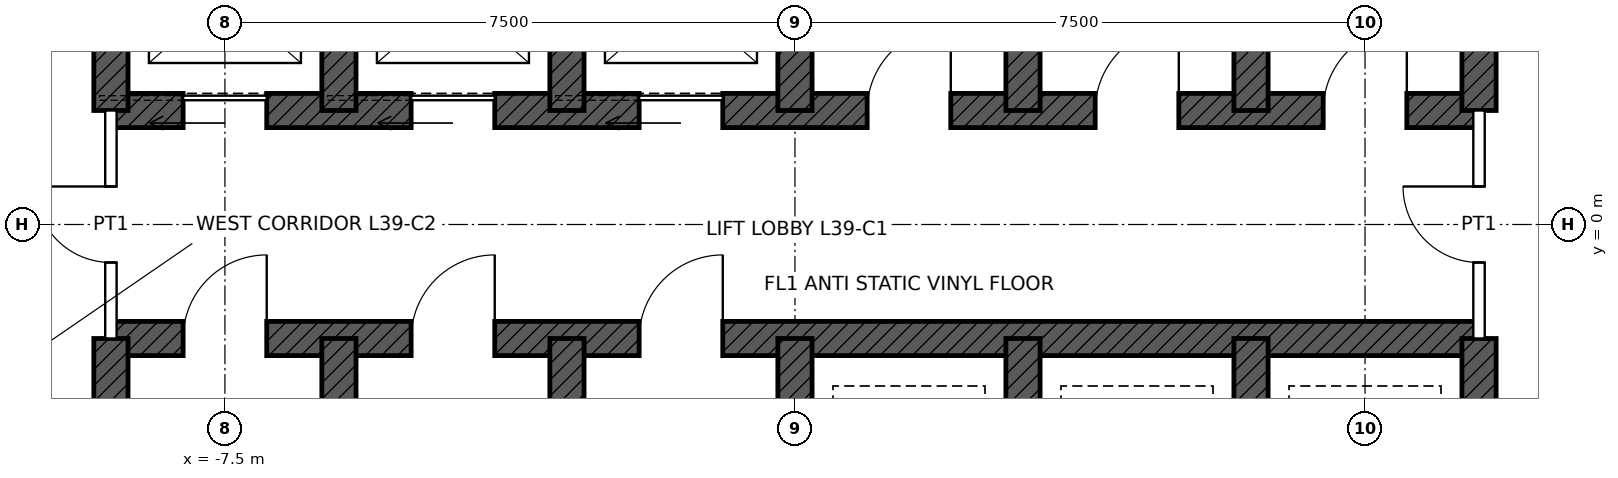
"""IFC4 building model, lengths in metres.
Left out: names, types, materials, properties, quantities, classifications, styles, units other than length and angle.
Written with IfcOpenShell. Run it as: python <this file> out.ifc"""

import sys

from ifc_helpers import new_model, si_unit, direction, frame, frame_2d, origin, place, context, subcontext, project, spatial, rectangle, extrude, element, fill, save


model = new_model("IFC4")
c1 = context("Model", 3, precision=1e-05, world=origin(), true_north=direction((0.0, 1.0)))
c2 = subcontext(c1, "Body", "Model", "MODEL_VIEW")
j1 = project(units=[si_unit("LENGTHUNIT", "METRE"), si_unit("PLANEANGLEUNIT", "RADIAN")], contexts=[c1])
p1 = place(None, origin())
s1 = spatial("IfcSite", under=j1, at=p1, CompositionType="ELEMENT")
p2 = place(p1, origin())
s2 = spatial("IfcBuilding", under=s1, at=p2, CompositionType="ELEMENT")
p3 = place(p2, frame((0.0, 0.0, 189.9)))
s3 = spatial("IfcBuildingStorey", under=s2, at=p3, CompositionType="ELEMENT", Elevation=189.9)
p4 = place(p3, frame((-9.0, 1.5, 0.0), z_axis=(0.0, 0.0, 1.0), x_axis=(1.0, 0.0, 0.0)))
e1 = element("IfcWall", 1, at=p4, inside=s3, PredefinedType="SHEAR", context=c2, shape_type="SweptSolid", body=[
    extrude(rectangle(XDim=18.0, YDim=0.45, at=frame_2d((9.0, 0.0))), origin(), (0.0, 0.0, 1.0), 4.0),
])
p5 = place(p4, frame((0.95, 0.0, 0.0)))
e2 = element("IfcOpeningElement", 2, at=p5, cuts=e1, PredefinedType="OPENING", context=c2, shape_type="SweptSolid", body=[
    extrude(rectangle(XDim=1.1, YDim=2.1, at=frame_2d((0.55, 1.05))), frame((0.0, 0.235, 0.0), z_axis=(0.0, -1.0, 0.0), x_axis=(1.0, 0.0, 0.0)), (0.0, 0.0, 1.0), 0.47),
])
p6 = place(p4, frame((3.95, 0.0, 0.0)))
e3 = element("IfcOpeningElement", 3, at=p6, cuts=e1, PredefinedType="OPENING", context=c2, shape_type="SweptSolid", body=[
    extrude(rectangle(XDim=1.1, YDim=2.1, at=frame_2d((0.55, 1.05))), frame((0.0, 0.235, 0.0), z_axis=(0.0, -1.0, 0.0), x_axis=(1.0, 0.0, 0.0)), (0.0, 0.0, 1.0), 0.47),
])
p7 = place(p4, frame((6.95, 0.0, 0.0)))
e4 = element("IfcOpeningElement", 4, at=p7, cuts=e1, PredefinedType="OPENING", context=c2, shape_type="SweptSolid", body=[
    extrude(rectangle(XDim=1.1, YDim=2.1, at=frame_2d((0.55, 1.05))), frame((0.0, 0.235, 0.0), z_axis=(0.0, -1.0, 0.0), x_axis=(1.0, 0.0, 0.0)), (0.0, 0.0, 1.0), 0.47),
])
p8 = place(p4, frame((9.95, 0.0, 0.0)))
e5 = element("IfcOpeningElement", 5, at=p8, cuts=e1, PredefinedType="OPENING", context=c2, shape_type="SweptSolid", body=[
    extrude(rectangle(XDim=1.1, YDim=2.1, at=frame_2d((0.55, 1.05))), frame((0.0, 0.235, 0.0), z_axis=(0.0, -1.0, 0.0), x_axis=(1.0, 0.0, 0.0)), (0.0, 0.0, 1.0), 0.47),
])
p9 = place(p4, frame((12.95, 0.0, 0.0)))
e6 = element("IfcOpeningElement", 6, at=p9, cuts=e1, PredefinedType="OPENING", context=c2, shape_type="SweptSolid", body=[
    extrude(rectangle(XDim=1.1, YDim=2.1, at=frame_2d((0.55, 1.05))), frame((0.0, 0.235, 0.0), z_axis=(0.0, -1.0, 0.0), x_axis=(1.0, 0.0, 0.0)), (0.0, 0.0, 1.0), 0.47),
])
p10 = place(p4, frame((15.95, 0.0, 0.0)))
e7 = element("IfcOpeningElement", 7, at=p10, cuts=e1, PredefinedType="OPENING", context=c2, shape_type="SweptSolid", body=[
    extrude(rectangle(XDim=1.1, YDim=2.1, at=frame_2d((0.55, 1.05))), frame((0.0, 0.235, 0.0), z_axis=(0.0, -1.0, 0.0), x_axis=(1.0, 0.0, 0.0)), (0.0, 0.0, 1.0), 0.47),
])
p11 = place(p3, frame((-9.0, -1.5, 0.0), z_axis=(0.0, 0.0, 1.0), x_axis=(1.0, 0.0, 0.0)))
e8 = element("IfcWall", 8, at=p11, inside=s3, PredefinedType="SHEAR", context=c2, shape_type="SweptSolid", body=[
    extrude(rectangle(XDim=18.0, YDim=0.45, at=frame_2d((9.0, 0.0))), origin(), (0.0, 0.0, 1.0), 4.0),
])
p12 = place(p11, frame((0.95, 0.0, 0.0)))
e9 = element("IfcOpeningElement", 9, at=p12, cuts=e8, PredefinedType="OPENING", context=c2, shape_type="SweptSolid", body=[
    extrude(rectangle(XDim=1.1, YDim=2.1, at=frame_2d((0.55, 1.05))), frame((0.0, 0.235, 0.0), z_axis=(0.0, -1.0, 0.0), x_axis=(1.0, 0.0, 0.0)), (0.0, 0.0, 1.0), 0.47),
])
p13 = place(p11, frame((3.95, 0.0, 0.0)))
e10 = element("IfcOpeningElement", 10, at=p13, cuts=e8, PredefinedType="OPENING", context=c2, shape_type="SweptSolid", body=[
    extrude(rectangle(XDim=1.1, YDim=2.1, at=frame_2d((0.55, 1.05))), frame((0.0, 0.235, 0.0), z_axis=(0.0, -1.0, 0.0), x_axis=(1.0, 0.0, 0.0)), (0.0, 0.0, 1.0), 0.47),
])
p14 = place(p11, frame((6.95, 0.0, 0.0)))
e11 = element("IfcOpeningElement", 11, at=p14, cuts=e8, PredefinedType="OPENING", context=c2, shape_type="SweptSolid", body=[
    extrude(rectangle(XDim=1.1, YDim=2.1, at=frame_2d((0.55, 1.05))), frame((0.0, 0.235, 0.0), z_axis=(0.0, -1.0, 0.0), x_axis=(1.0, 0.0, 0.0)), (0.0, 0.0, 1.0), 0.47),
])
for number, where, z_axis, x_axis in (
    (12, (-9.0, 1.5, 0.0), (0.0, 0.0, 1.0), (0.0, 1.0, 0.0)),
    (13, (9.0, 1.5, 0.0), (0.0, 0.0, 1.0), (0.0, 1.0, 0.0)),
    (14, (-9.0, -4.5, 0.0), (0.0, 0.0, 1.0), (0.0, 1.0, 0.0)),
    (15, (9.0, -4.5, 0.0), (0.0, 0.0, 1.0), (0.0, 1.0, 0.0)),
    (16, (-6.0, 1.5, 0.0), (0.0, 0.0, 1.0), (0.0, 1.0, 0.0)),
    (17, (-3.0, 1.5, 0.0), (0.0, 0.0, 1.0), (0.0, 1.0, 0.0)),
    (18, (0.0, 1.5, 0.0), (0.0, 0.0, 1.0), (0.0, 1.0, 0.0)),
    (19, (3.0, 1.5, 0.0), (0.0, 0.0, 1.0), (0.0, 1.0, 0.0)),
    (20, (6.0, 1.5, 0.0), (0.0, 0.0, 1.0), (0.0, 1.0, 0.0)),
    (21, (-6.0, -4.5, 0.0), (0.0, 0.0, 1.0), (0.0, 1.0, 0.0)),
    (22, (-3.0, -4.5, 0.0), (0.0, 0.0, 1.0), (0.0, 1.0, 0.0)),
    (23, (0.0, -4.5, 0.0), (0.0, 0.0, 1.0), (0.0, 1.0, 0.0)),
    (24, (3.0, -4.5, 0.0), (0.0, 0.0, 1.0), (0.0, 1.0, 0.0)),
    (25, (6.0, -4.5, 0.0), (0.0, 0.0, 1.0), (0.0, 1.0, 0.0)),
):
    element("IfcWall", number, at=place(p3, frame(where, z_axis=z_axis, x_axis=x_axis)), inside=s3, PredefinedType="SHEAR", context=c2, shape_type="SweptSolid", body=[
        extrude(rectangle(XDim=3.0, YDim=0.45, at=frame_2d((1.5, 0.0))), origin(), (0.0, 0.0, 1.0), 4.0),
    ])
p15 = place(p3, frame((-9.0, -1.5, 0.0), z_axis=(0.0, 0.0, 1.0), x_axis=(0.0, 1.0, 0.0)))
e26 = element("IfcWall", 26, at=p15, inside=s3, PredefinedType="PARTITIONING", context=c2, shape_type="SweptSolid", body=[
    extrude(rectangle(XDim=3.0, YDim=0.15, at=frame_2d((1.5, 0.0))), origin(), (0.0, 0.0, 1.0), 3.75),
])
p16 = place(p15, frame((1.0, 0.0, 0.0)))
e27 = element("IfcOpeningElement", 27, at=p16, cuts=e26, PredefinedType="OPENING", context=c2, shape_type="SweptSolid", body=[
    extrude(rectangle(XDim=1.0, YDim=2.4, at=frame_2d((0.5, 1.2))), frame((0.0, 0.085, 0.0), z_axis=(0.0, -1.0, 0.0), x_axis=(1.0, 0.0, 0.0)), (0.0, 0.0, 1.0), 0.17),
])
p17 = place(p3, frame((9.0, -1.5, 0.0), z_axis=(0.0, 0.0, 1.0), x_axis=(0.0, 1.0, 0.0)))
e28 = element("IfcWall", 28, at=p17, inside=s3, PredefinedType="PARTITIONING", context=c2, shape_type="SweptSolid", body=[
    extrude(rectangle(XDim=3.0, YDim=0.15, at=frame_2d((1.5, 0.0))), origin(), (0.0, 0.0, 1.0), 3.75),
])
p18 = place(p17, frame((1.0, 0.0, 0.0)))
e29 = element("IfcOpeningElement", 29, at=p18, cuts=e28, PredefinedType="OPENING", context=c2, shape_type="SweptSolid", body=[
    extrude(rectangle(XDim=1.0, YDim=2.4, at=frame_2d((0.5, 1.2))), frame((0.0, 0.085, 0.0), z_axis=(0.0, -1.0, 0.0), x_axis=(1.0, 0.0, 0.0)), (0.0, 0.0, 1.0), 0.17),
])
p19 = place(p5, origin())
e30 = element("IfcDoor", 30, at=p19, inside=s3, OperationType="SLIDING_TO_LEFT", PredefinedType="DOOR", context=c2, shape_type="SweptSolid", body=[
    extrude(rectangle(XDim=1.1, YDim=2.1, at=frame_2d((0.55, 1.05))), frame((0.0, 0.025, 0.0), z_axis=(0.0, -1.0, 0.0), x_axis=(1.0, 0.0, 0.0)), (0.0, 0.0, 1.0), 0.05),
])
fill(e2, e30)
p20 = place(p6, origin())
e31 = element("IfcDoor", 31, at=p20, inside=s3, OperationType="SLIDING_TO_LEFT", PredefinedType="DOOR", context=c2, shape_type="SweptSolid", body=[
    extrude(rectangle(XDim=1.1, YDim=2.1, at=frame_2d((0.55, 1.05))), frame((0.0, 0.025, 0.0), z_axis=(0.0, -1.0, 0.0), x_axis=(1.0, 0.0, 0.0)), (0.0, 0.0, 1.0), 0.05),
])
fill(e3, e31)
p21 = place(p7, origin())
e32 = element("IfcDoor", 32, at=p21, inside=s3, OperationType="SLIDING_TO_LEFT", PredefinedType="DOOR", context=c2, shape_type="SweptSolid", body=[
    extrude(rectangle(XDim=1.1, YDim=2.1, at=frame_2d((0.55, 1.05))), frame((0.0, 0.025, 0.0), z_axis=(0.0, -1.0, 0.0), x_axis=(1.0, 0.0, 0.0)), (0.0, 0.0, 1.0), 0.05),
])
fill(e4, e32)
p22 = place(p16, origin())
e33 = element("IfcDoor", 33, at=p22, inside=s3, OperationType="SINGLE_SWING_RIGHT", PredefinedType="DOOR", context=c2, shape_type="SweptSolid", body=[
    extrude(rectangle(XDim=1.0, YDim=2.4, at=frame_2d((0.5, 1.2))), frame((0.0, 0.025, 0.0), z_axis=(0.0, -1.0, 0.0), x_axis=(1.0, 0.0, 0.0)), (0.0, 0.0, 1.0), 0.05),
])
fill(e27, e33)
p23 = place(p18, origin())
e34 = element("IfcDoor", 34, at=p23, inside=s3, OperationType="SINGLE_SWING_RIGHT", PredefinedType="DOOR", context=c2, shape_type="SweptSolid", body=[
    extrude(rectangle(XDim=1.0, YDim=2.4, at=frame_2d((0.5, 1.2))), frame((0.0, 0.025, 0.0), z_axis=(0.0, -1.0, 0.0), x_axis=(1.0, 0.0, 0.0)), (0.0, 0.0, 1.0), 0.05),
])
fill(e29, e34)
p24 = place(p8, origin())
e35 = element("IfcDoor", 35, at=p24, inside=s3, OperationType="SINGLE_SWING_RIGHT", PredefinedType="DOOR", context=c2, shape_type="SweptSolid", body=[
    extrude(rectangle(XDim=1.1, YDim=2.1, at=frame_2d((0.55, 1.05))), frame((0.0, 0.025, 0.0), z_axis=(0.0, -1.0, 0.0), x_axis=(1.0, 0.0, 0.0)), (0.0, 0.0, 1.0), 0.05),
])
fill(e5, e35)
p25 = place(p9, origin())
e36 = element("IfcDoor", 36, at=p25, inside=s3, OperationType="SINGLE_SWING_RIGHT", PredefinedType="DOOR", context=c2, shape_type="SweptSolid", body=[
    extrude(rectangle(XDim=1.1, YDim=2.1, at=frame_2d((0.55, 1.05))), frame((0.0, 0.025, 0.0), z_axis=(0.0, -1.0, 0.0), x_axis=(1.0, 0.0, 0.0)), (0.0, 0.0, 1.0), 0.05),
])
fill(e6, e36)
p26 = place(p10, origin())
e37 = element("IfcDoor", 37, at=p26, inside=s3, OperationType="SINGLE_SWING_RIGHT", PredefinedType="DOOR", context=c2, shape_type="SweptSolid", body=[
    extrude(rectangle(XDim=1.1, YDim=2.1, at=frame_2d((0.55, 1.05))), frame((0.0, 0.025, 0.0), z_axis=(0.0, -1.0, 0.0), x_axis=(1.0, 0.0, 0.0)), (0.0, 0.0, 1.0), 0.05),
])
fill(e7, e37)
p27 = place(p12, origin())
e38 = element("IfcDoor", 38, at=p27, inside=s3, OperationType="SINGLE_SWING_RIGHT", PredefinedType="DOOR", context=c2, shape_type="SweptSolid", body=[
    extrude(rectangle(XDim=1.1, YDim=2.1, at=frame_2d((0.55, 1.05))), frame((0.0, 0.025, 0.0), z_axis=(0.0, -1.0, 0.0), x_axis=(1.0, 0.0, 0.0)), (0.0, 0.0, 1.0), 0.05),
])
fill(e9, e38)
p28 = place(p13, origin())
e39 = element("IfcDoor", 39, at=p28, inside=s3, OperationType="SINGLE_SWING_RIGHT", PredefinedType="DOOR", context=c2, shape_type="SweptSolid", body=[
    extrude(rectangle(XDim=1.1, YDim=2.1, at=frame_2d((0.55, 1.05))), frame((0.0, 0.025, 0.0), z_axis=(0.0, -1.0, 0.0), x_axis=(1.0, 0.0, 0.0)), (0.0, 0.0, 1.0), 0.05),
])
fill(e10, e39)
p29 = place(p14, origin())
e40 = element("IfcDoor", 40, at=p29, inside=s3, OperationType="SINGLE_SWING_RIGHT", PredefinedType="DOOR", context=c2, shape_type="SweptSolid", body=[
    extrude(rectangle(XDim=1.1, YDim=2.1, at=frame_2d((0.55, 1.05))), frame((0.0, 0.025, 0.0), z_axis=(0.0, -1.0, 0.0), x_axis=(1.0, 0.0, 0.0)), (0.0, 0.0, 1.0), 0.05),
])
fill(e11, e40)
save(model, sys.argv[1])
